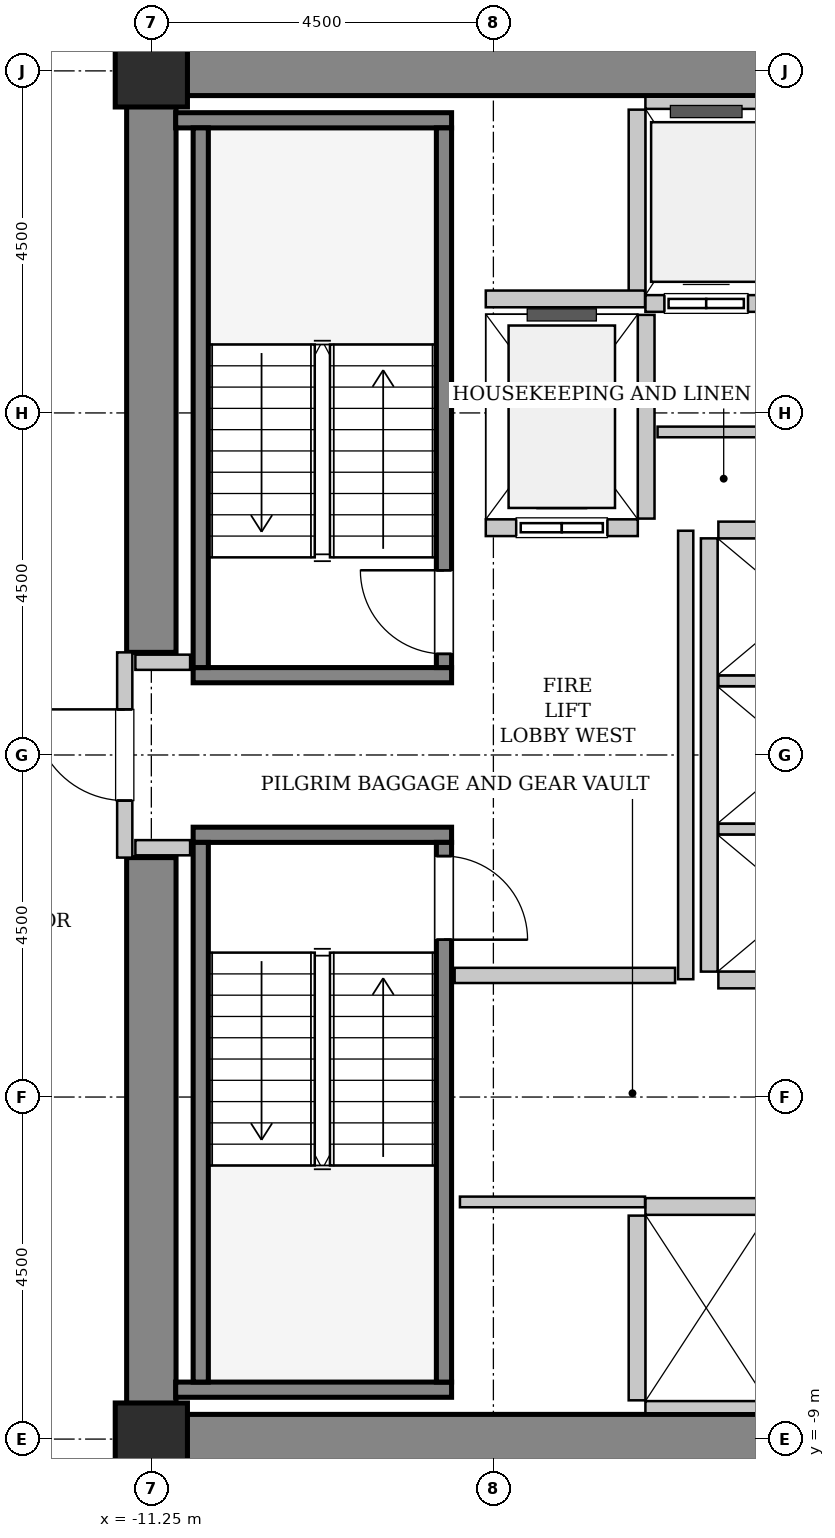
"""IFC4 building model, lengths in metres.
Left out: names, types, materials, properties, quantities, classifications, styles, units other than length and angle.
Written with IfcOpenShell. Run it as: python <this file> out.ifc"""

import sys

from ifc_helpers import new_model, si_unit, direction, frame, frame_2d, origin, origin_2d, place, context, subcontext, project, spatial, rectangle, hollow_rectangle, extrude, source, transform, mapped, element, fill, save


model = new_model("IFC4")
c1 = context("Model", 3, precision=1e-05, world=origin(), true_north=direction((0.0, 1.0)))
c2 = subcontext(c1, "Body", "Model", "MODEL_VIEW")
j1 = project(units=[si_unit("LENGTHUNIT", "METRE"), si_unit("PLANEANGLEUNIT", "RADIAN")], contexts=[c1])
p1 = place(None, origin())
s1 = spatial("IfcSite", under=j1, at=p1, CompositionType="ELEMENT")
p2 = place(p1, origin())
s2 = spatial("IfcBuilding", under=s1, at=p2, CompositionType="ELEMENT")
p3 = place(p2, frame((0.0, 0.0, 48.2)))
s3 = spatial("IfcBuildingStorey", under=s2, at=p3, CompositionType="ELEMENT", Elevation=48.2)
m1 = source(origin(), c2, "Body", "SweptSolid", [
    extrude(rectangle(XDim=10.025, YDim=0.65, at=frame_2d((5.012, 0.0))), origin(), (0.0, 0.0, 1.0), 3.8),
])
for number, where, z_axis, x_axis in (
    (1, (-11.575, 9.0, 0.0), (0.0, 0.0, 1.0), (1.0, 0.0, 0.0)),
    (2, (-11.575, -9.0, 0.0), (0.0, 0.0, 1.0), (1.0, 0.0, 0.0)),
):
    element("IfcWall", number, at=place(p3, frame(where, z_axis=z_axis, x_axis=x_axis)), inside=s3, PredefinedType="SHEAR", context=c2, shape_type="MappedRepresentation", body=[
        mapped(m1, transform((0.0, 0.0, 0.0), x_axis=(1.0, 0.0, 0.0), y_axis=(0.0, 1.0, 0.0), z_axis=(0.0, 0.0, 1.0), scale=1.0)),
    ])
m2 = source(origin(), c2, "Body", "SweptSolid", [
    extrude(rectangle(XDim=7.325, YDim=0.65, at=frame_2d((3.663, 0.0))), origin(), (0.0, 0.0, 1.0), 3.8),
])
for number, where, z_axis, x_axis in (
    (3, (-11.25, -8.675, 0.0), (0.0, 0.0, 1.0), (0.0, 1.0, 0.0)),
    (4, (-11.25, 1.35, 0.0), (0.0, 0.0, 1.0), (0.0, 1.0, 0.0)),
):
    element("IfcWall", number, at=place(p3, frame(where, z_axis=z_axis, x_axis=x_axis)), inside=s3, PredefinedType="SHEAR", context=c2, shape_type="MappedRepresentation", body=[
        mapped(m2, transform((0.0, 0.0, 0.0), x_axis=(1.0, 0.0, 0.0), y_axis=(0.0, 1.0, 0.0), z_axis=(0.0, 0.0, 1.0), scale=1.0)),
    ])
m3 = source(origin(), c2, "Body", "SweptSolid", [
    extrude(hollow_rectangle(XDim=0.95, YDim=0.95, WallThickness=0.045, InnerFilletRadius=0.045, OuterFilletRadius=0.09, at=origin_2d()), origin(), (0.0, 0.0, 1.0), 3.8),
])
for number, where, z_axis, x_axis in (
    (5, (-11.25, -9.0, 0.0), (0.0, 0.0, 1.0), (1.0, 0.0, 0.0)),
    (6, (-11.25, 9.0, 0.0), (0.0, 0.0, 1.0), (1.0, 0.0, 0.0)),
):
    element("IfcColumn", number, at=place(p3, frame(where, z_axis=z_axis, x_axis=x_axis)), inside=s3, PredefinedType="COLUMN", context=c2, shape_type="MappedRepresentation", body=[
        mapped(m3, transform((0.0, 0.0, 0.0), x_axis=(1.0, 0.0, 0.0), y_axis=(0.0, 1.0, 0.0), z_axis=(0.0, 0.0, 1.0), scale=1.0)),
    ])
m4 = source(origin(), c2, "Body", "SweptSolid", [
    extrude(rectangle(XDim=3.4, YDim=0.2, at=frame_2d((1.7, 0.0))), origin(), (0.0, 0.0, 1.0), 3.8),
])
p4 = place(p3, frame((-7.3, 1.05, 0.0), z_axis=(0.0, 0.0, 1.0), x_axis=(-1.0, 0.0, 0.0)))
e7 = element("IfcWall", 7, at=p4, inside=s3, PredefinedType="SOLIDWALL", context=c2, shape_type="MappedRepresentation", body=[
    mapped(m4, transform((0.0, 0.0, 0.0), x_axis=(1.0, 0.0, 0.0), y_axis=(0.0, 1.0, 0.0), z_axis=(0.0, 0.0, 1.0), scale=1.0)),
])
m5 = source(origin(), c2, "Body", "SweptSolid", [
    extrude(rectangle(XDim=3.63, YDim=0.2, at=frame_2d((1.815, 0.0))), origin(), (0.0, 0.0, 1.0), 3.8),
])
p5 = place(p3, frame((-7.3, 8.35, 0.0), z_axis=(0.0, 0.0, 1.0), x_axis=(-1.0, 0.0, 0.0)))
e8 = element("IfcWall", 8, at=p5, inside=s3, PredefinedType="SOLIDWALL", context=c2, shape_type="MappedRepresentation", body=[
    mapped(m5, transform((0.0, 0.0, 0.0), x_axis=(1.0, 0.0, 0.0), y_axis=(0.0, 1.0, 0.0), z_axis=(0.0, 0.0, 1.0), scale=1.0)),
])
m6 = source(origin(), c2, "Body", "SweptSolid", [
    extrude(rectangle(XDim=7.1, YDim=0.2, at=frame_2d((3.55, 0.0))), origin(), (0.0, 0.0, 1.0), 3.8),
])
p6 = place(p3, frame((-7.4, 1.15, 0.0), z_axis=(0.0, 0.0, 1.0), x_axis=(0.0, 1.0, 0.0)))
e9 = element("IfcWall", 9, at=p6, inside=s3, PredefinedType="SOLIDWALL", context=c2, shape_type="MappedRepresentation", body=[
    mapped(m6, transform((0.0, 0.0, 0.0), x_axis=(1.0, 0.0, 0.0), y_axis=(0.0, 1.0, 0.0), z_axis=(0.0, 0.0, 1.0), scale=1.0)),
])
p7 = place(p6, frame((0.18, 0.0, 0.0)))
e10 = element("IfcOpeningElement", 10, at=p7, cuts=e9, PredefinedType="OPENING", context=c2, shape_type="SweptSolid", body=[
    extrude(rectangle(XDim=1.1, YDim=2.15, at=frame_2d((0.55, 1.075))), frame((0.0, 0.11, 0.0), z_axis=(0.0, -1.0, 0.0), x_axis=(1.0, 0.0, 0.0)), (0.0, 0.0, 1.0), 0.22),
])
p8 = place(p3, frame((-10.6, 1.15, 0.0), z_axis=(0.0, 0.0, 1.0), x_axis=(0.0, 1.0, 0.0)))
e11 = element("IfcWall", 11, at=p8, inside=s3, PredefinedType="SOLIDWALL", context=c2, shape_type="MappedRepresentation", body=[
    mapped(m6, transform((0.0, 0.0, 0.0), x_axis=(1.0, 0.0, 0.0), y_axis=(0.0, 1.0, 0.0), z_axis=(0.0, 0.0, 1.0), scale=1.0)),
])
p9 = place(p3, frame((-10.7, -1.05, 0.0), z_axis=(0.0, 0.0, 1.0), x_axis=(1.0, 0.0, 0.0)))
e12 = element("IfcWall", 12, at=p9, inside=s3, PredefinedType="SOLIDWALL", context=c2, shape_type="MappedRepresentation", body=[
    mapped(m4, transform((0.0, 0.0, 0.0), x_axis=(1.0, 0.0, 0.0), y_axis=(0.0, 1.0, 0.0), z_axis=(0.0, 0.0, 1.0), scale=1.0)),
])
p10 = place(p3, frame((-10.93, -8.35, 0.0), z_axis=(0.0, 0.0, 1.0), x_axis=(1.0, 0.0, 0.0)))
e13 = element("IfcWall", 13, at=p10, inside=s3, PredefinedType="SOLIDWALL", context=c2, shape_type="MappedRepresentation", body=[
    mapped(m5, transform((0.0, 0.0, 0.0), x_axis=(1.0, 0.0, 0.0), y_axis=(0.0, 1.0, 0.0), z_axis=(0.0, 0.0, 1.0), scale=1.0)),
])
p11 = place(p3, frame((-10.6, -1.15, 0.0), z_axis=(0.0, 0.0, 1.0), x_axis=(0.0, -1.0, 0.0)))
e14 = element("IfcWall", 14, at=p11, inside=s3, PredefinedType="SOLIDWALL", context=c2, shape_type="MappedRepresentation", body=[
    mapped(m6, transform((0.0, 0.0, 0.0), x_axis=(1.0, 0.0, 0.0), y_axis=(0.0, 1.0, 0.0), z_axis=(0.0, 0.0, 1.0), scale=1.0)),
])
p12 = place(p3, frame((-7.4, -1.15, 0.0), z_axis=(0.0, 0.0, 1.0), x_axis=(0.0, -1.0, 0.0)))
e15 = element("IfcWall", 15, at=p12, inside=s3, PredefinedType="SOLIDWALL", context=c2, shape_type="MappedRepresentation", body=[
    mapped(m6, transform((0.0, 0.0, 0.0), x_axis=(1.0, 0.0, 0.0), y_axis=(0.0, 1.0, 0.0), z_axis=(0.0, 0.0, 1.0), scale=1.0)),
])
p13 = place(p12, frame((0.18, 0.0, 0.0)))
e16 = element("IfcOpeningElement", 16, at=p13, cuts=e15, PredefinedType="OPENING", context=c2, shape_type="SweptSolid", body=[
    extrude(rectangle(XDim=1.1, YDim=2.15, at=frame_2d((0.55, 1.075))), frame((0.0, 0.11, 0.0), z_axis=(0.0, -1.0, 0.0), x_axis=(1.0, 0.0, 0.0)), (0.0, 0.0, 1.0), 0.22),
])
m7 = source(origin(), c2, "Body", "SweptSolid", [
    extrude(rectangle(XDim=2.0, YDim=0.22, at=frame_2d((1.0, 0.0))), origin(), (0.0, 0.0, 1.0), 3.535),
])
p14 = place(p3, frame((-6.85, 2.99, 0.0), z_axis=(0.0, 0.0, 1.0), x_axis=(1.0, 0.0, 0.0)))
e17 = element("IfcWall", 17, at=p14, inside=s3, PredefinedType="SOLIDWALL", context=c2, shape_type="MappedRepresentation", body=[
    mapped(m7, transform((0.0, 0.0, 0.0), x_axis=(1.0, 0.0, 0.0), y_axis=(0.0, 1.0, 0.0), z_axis=(0.0, 0.0, 1.0), scale=1.0)),
])
p15 = place(p14, frame((0.4, 0.0, 0.0)))
e18 = element("IfcOpeningElement", 18, at=p15, cuts=e17, PredefinedType="OPENING", context=c2, shape_type="SweptSolid", body=[
    extrude(rectangle(XDim=1.2, YDim=2.2, at=frame_2d((0.6, 1.1))), frame((0.0, 0.12, 0.0), z_axis=(0.0, -1.0, 0.0), x_axis=(1.0, 0.0, 0.0)), (0.0, 0.0, 1.0), 0.24),
])
m8 = source(origin(), c2, "Body", "SweptSolid", [
    extrude(rectangle(XDim=2.68, YDim=0.22, at=frame_2d((1.34, 0.0))), origin(), (0.0, 0.0, 1.0), 3.535),
])
p16 = place(p3, frame((-4.74, 3.11, 0.0), z_axis=(0.0, 0.0, 1.0), x_axis=(0.0, 1.0, 0.0)))
e19 = element("IfcWall", 19, at=p16, inside=s3, PredefinedType="SOLIDWALL", context=c2, shape_type="MappedRepresentation", body=[
    mapped(m8, transform((0.0, 0.0, 0.0), x_axis=(1.0, 0.0, 0.0), y_axis=(0.0, 1.0, 0.0), z_axis=(0.0, 0.0, 1.0), scale=1.0)),
])
m9 = source(origin(), c2, "Body", "SweptSolid", [
    extrude(rectangle(XDim=3.2, YDim=0.22, at=frame_2d((1.6, 0.0))), origin(), (0.0, 0.0, 1.0), 3.535),
])
p17 = place(p3, frame((-4.75, 5.94, 0.0), z_axis=(0.0, 0.0, 1.0), x_axis=(1.0, 0.0, 0.0)))
e20 = element("IfcWall", 20, at=p17, inside=s3, PredefinedType="SOLIDWALL", context=c2, shape_type="MappedRepresentation", body=[
    mapped(m9, transform((0.0, 0.0, 0.0), x_axis=(1.0, 0.0, 0.0), y_axis=(0.0, 1.0, 0.0), z_axis=(0.0, 0.0, 1.0), scale=1.0)),
])
p18 = place(p17, frame((0.25, 0.0, 0.0)))
e21 = element("IfcOpeningElement", 21, at=p18, cuts=e20, PredefinedType="OPENING", context=c2, shape_type="SweptSolid", body=[
    extrude(rectangle(XDim=1.1, YDim=2.2, at=frame_2d((0.55, 1.1))), frame((0.0, 0.12, 0.0), z_axis=(0.0, -1.0, 0.0), x_axis=(1.0, 0.0, 0.0)), (0.0, 0.0, 1.0), 0.24),
])
p19 = place(p17, frame((1.875, 0.0, 0.0)))
e22 = element("IfcOpeningElement", 22, at=p19, cuts=e20, PredefinedType="OPENING", context=c2, shape_type="SweptSolid", body=[
    extrude(rectangle(XDim=1.1, YDim=2.2, at=frame_2d((0.55, 1.1))), frame((0.0, 0.12, 0.0), z_axis=(0.0, -1.0, 0.0), x_axis=(1.0, 0.0, 0.0)), (0.0, 0.0, 1.0), 0.24),
])
m10 = source(origin(), c2, "Body", "SweptSolid", [
    extrude(rectangle(XDim=3.2, YDim=0.16, at=frame_2d((1.6, 0.0))), origin(), (0.0, 0.0, 1.0), 2.425),
])
p20 = place(p3, frame((-1.55, 8.58, 0.0), z_axis=(0.0, 0.0, 1.0), x_axis=(-1.0, 0.0, 0.0)))
e23 = element("IfcWall", 23, at=p20, inside=s3, PredefinedType="PARTITIONING", context=c2, shape_type="MappedRepresentation", body=[
    mapped(m10, transform((0.0, 0.0, 0.0), x_axis=(1.0, 0.0, 0.0), y_axis=(0.0, 1.0, 0.0), z_axis=(0.0, 0.0, 1.0), scale=1.0)),
])
m11 = source(origin(), c2, "Body", "SweptSolid", [
    extrude(rectangle(XDim=2.43, YDim=0.22, at=frame_2d((1.215, 0.0))), origin(), (0.0, 0.0, 1.0), 3.535),
])
p21 = place(p3, frame((-4.86, 8.49, 0.0), z_axis=(0.0, 0.0, 1.0), x_axis=(0.0, -1.0, 0.0)))
e24 = element("IfcWall", 24, at=p21, inside=s3, PredefinedType="SOLIDWALL", context=c2, shape_type="MappedRepresentation", body=[
    mapped(m11, transform((0.0, 0.0, 0.0), x_axis=(1.0, 0.0, 0.0), y_axis=(0.0, 1.0, 0.0), z_axis=(0.0, 0.0, 1.0), scale=1.0)),
])
p22 = place(p3, frame((-1.55, -5.94, 0.0), z_axis=(0.0, 0.0, 1.0), x_axis=(-1.0, 0.0, 0.0)))
e25 = element("IfcWall", 25, at=p22, inside=s3, PredefinedType="SOLIDWALL", context=c2, shape_type="MappedRepresentation", body=[
    mapped(m9, transform((0.0, 0.0, 0.0), x_axis=(1.0, 0.0, 0.0), y_axis=(0.0, 1.0, 0.0), z_axis=(0.0, 0.0, 1.0), scale=1.0)),
])
p23 = place(p3, frame((-4.75, -8.58, 0.0), z_axis=(0.0, 0.0, 1.0), x_axis=(1.0, 0.0, 0.0)))
e26 = element("IfcWall", 26, at=p23, inside=s3, PredefinedType="PARTITIONING", context=c2, shape_type="MappedRepresentation", body=[
    mapped(m10, transform((0.0, 0.0, 0.0), x_axis=(1.0, 0.0, 0.0), y_axis=(0.0, 1.0, 0.0), z_axis=(0.0, 0.0, 1.0), scale=1.0)),
])
p24 = place(p3, frame((-4.86, -6.06, 0.0), z_axis=(0.0, 0.0, 1.0), x_axis=(0.0, -1.0, 0.0)))
e27 = element("IfcWall", 27, at=p24, inside=s3, PredefinedType="SOLIDWALL", context=c2, shape_type="MappedRepresentation", body=[
    mapped(m11, transform((0.0, 0.0, 0.0), x_axis=(1.0, 0.0, 0.0), y_axis=(0.0, 1.0, 0.0), z_axis=(0.0, 0.0, 1.0), scale=1.0)),
])
m12 = source(origin(), c2, "Body", "SweptSolid", [
    extrude(rectangle(XDim=5.7, YDim=0.22, at=frame_2d((2.85, 0.0))), origin(), (0.0, 0.0, 1.0), 3.535),
])
p25 = place(p3, frame((-3.91, 2.85, 0.0), z_axis=(0.0, 0.0, 1.0), x_axis=(0.0, -1.0, 0.0)))
e28 = element("IfcWall", 28, at=p25, inside=s3, PredefinedType="SOLIDWALL", context=c2, shape_type="MappedRepresentation", body=[
    mapped(m12, transform((0.0, 0.0, 0.0), x_axis=(1.0, 0.0, 0.0), y_axis=(0.0, 1.0, 0.0), z_axis=(0.0, 0.0, 1.0), scale=1.0)),
])
m13 = source(origin(), c2, "Body", "SweptSolid", [
    extrude(rectangle(XDim=2.13, YDim=0.22, at=frame_2d((1.065, 0.0))), origin(), (0.0, 0.0, 1.0), 3.535),
])
p26 = place(p3, frame((-3.79, -2.96, 0.0), z_axis=(0.0, 0.0, 1.0), x_axis=(1.0, 0.0, 0.0)))
e29 = element("IfcWall", 29, at=p26, inside=s3, PredefinedType="SOLIDWALL", context=c2, shape_type="MappedRepresentation", body=[
    mapped(m13, transform((0.0, 0.0, 0.0), x_axis=(1.0, 0.0, 0.0), y_axis=(0.0, 1.0, 0.0), z_axis=(0.0, 0.0, 1.0), scale=1.0)),
])
m14 = source(origin(), c2, "Body", "SweptSolid", [
    extrude(rectangle(XDim=2.13, YDim=0.14, at=frame_2d((1.065, 0.0))), origin(), (0.0, 0.0, 1.0), 3.535),
])
for number, where, z_axis, x_axis in (
    (30, (-3.79, -0.975, 0.0), (0.0, 0.0, 1.0), (1.0, 0.0, 0.0)),
    (31, (-3.79, 0.975, 0.0), (0.0, 0.0, 1.0), (1.0, 0.0, 0.0)),
):
    element("IfcWall", number, at=place(p3, frame(where, z_axis=z_axis, x_axis=x_axis)), inside=s3, PredefinedType="PARTITIONING", context=c2, shape_type="MappedRepresentation", body=[
        mapped(m14, transform((0.0, 0.0, 0.0), x_axis=(1.0, 0.0, 0.0), y_axis=(0.0, 1.0, 0.0), z_axis=(0.0, 0.0, 1.0), scale=1.0)),
    ])
p27 = place(p3, frame((-1.66, 2.96, 0.0), z_axis=(0.0, 0.0, 1.0), x_axis=(-1.0, 0.0, 0.0)))
e32 = element("IfcWall", 32, at=p27, inside=s3, PredefinedType="SOLIDWALL", context=c2, shape_type="MappedRepresentation", body=[
    mapped(m13, transform((0.0, 0.0, 0.0), x_axis=(1.0, 0.0, 0.0), y_axis=(0.0, 1.0, 0.0), z_axis=(0.0, 0.0, 1.0), scale=1.0)),
])
m15 = source(origin(), c2, "Body", "SweptSolid", [
    extrude(rectangle(XDim=2.095, YDim=0.22, at=frame_2d((1.048, 0.0))), origin(), (0.0, 0.0, 1.0), 3.535),
])
p28 = place(p3, frame((-6.85, 6.0, 0.0), z_axis=(0.0, 0.0, 1.0), x_axis=(1.0, 0.0, 0.0)))
e33 = element("IfcWall", 33, at=p28, inside=s3, PredefinedType="SOLIDWALL", context=c2, shape_type="MappedRepresentation", body=[
    mapped(m15, transform((0.0, 0.0, 0.0), x_axis=(1.0, 0.0, 0.0), y_axis=(0.0, 1.0, 0.0), z_axis=(0.0, 0.0, 1.0), scale=1.0)),
])
m16 = source(origin(), c2, "Body", "SweptSolid", [
    extrude(rectangle(XDim=2.7, YDim=0.2, at=frame_2d((1.35, 0.0))), origin(), (0.0, 0.0, 1.0), 2.425),
])
p29 = place(p3, frame((-11.6, -1.35, 0.0), z_axis=(0.0, 0.0, 1.0), x_axis=(0.0, 1.0, 0.0)))
e34 = element("IfcWall", 34, at=p29, inside=s3, PredefinedType="PARTITIONING", context=c2, shape_type="MappedRepresentation", body=[
    mapped(m16, transform((0.0, 0.0, 0.0), x_axis=(1.0, 0.0, 0.0), y_axis=(0.0, 1.0, 0.0), z_axis=(0.0, 0.0, 1.0), scale=1.0)),
])
p30 = place(p29, frame((0.75, 0.0, 0.0)))
e35 = element("IfcOpeningElement", 35, at=p30, cuts=e34, PredefinedType="OPENING", context=c2, shape_type="SweptSolid", body=[
    extrude(rectangle(XDim=1.2, YDim=2.15, at=frame_2d((0.6, 1.075))), frame((0.0, 0.11, 0.0), z_axis=(0.0, -1.0, 0.0), x_axis=(1.0, 0.0, 0.0)), (0.0, 0.0, 1.0), 0.22),
])
m17 = source(origin(), c2, "Body", "SweptSolid", [
    extrude(rectangle(XDim=5.9, YDim=0.2, at=frame_2d((2.95, 0.0))), origin(), (0.0, 0.0, 1.0), 3.535),
])
p31 = place(p3, frame((-4.22, -2.95, 0.0), z_axis=(0.0, 0.0, 1.0), x_axis=(0.0, 1.0, 0.0)))
e36 = element("IfcWall", 36, at=p31, inside=s3, PredefinedType="PARTITIONING", context=c2, shape_type="MappedRepresentation", body=[
    mapped(m17, transform((0.0, 0.0, 0.0), x_axis=(1.0, 0.0, 0.0), y_axis=(0.0, 1.0, 0.0), z_axis=(0.0, 0.0, 1.0), scale=1.0)),
])
m18 = source(origin(), c2, "Body", "SweptSolid", [
    extrude(rectangle(XDim=2.9, YDim=0.2, at=frame_2d((1.45, 0.0))), origin(), (0.0, 0.0, 1.0), 3.535),
])
p32 = place(p3, frame((-7.26, -2.9, 0.0), z_axis=(0.0, 0.0, 1.0), x_axis=(1.0, 0.0, 0.0)))
e37 = element("IfcWall", 37, at=p32, inside=s3, PredefinedType="PARTITIONING", context=c2, shape_type="MappedRepresentation", body=[
    mapped(m18, transform((0.0, 0.0, 0.0), x_axis=(1.0, 0.0, 0.0), y_axis=(0.0, 1.0, 0.0), z_axis=(0.0, 0.0, 1.0), scale=1.0)),
])
m19 = source(origin(), c2, "Body", "SweptSolid", [
    extrude(rectangle(XDim=0.72, YDim=0.2, at=frame_2d((0.36, 0.0))), origin(), (0.0, 0.0, 1.0), 3.535),
])
for number, where, z_axis, x_axis in (
    (38, (-11.46, 1.22, 0.0), (0.0, 0.0, 1.0), (1.0, 0.0, 0.0)),
    (39, (-11.46, -1.22, 0.0), (0.0, 0.0, 1.0), (1.0, 0.0, 0.0)),
):
    element("IfcWall", number, at=place(p3, frame(where, z_axis=z_axis, x_axis=x_axis)), inside=s3, PredefinedType="PARTITIONING", context=c2, shape_type="MappedRepresentation", body=[
        mapped(m19, transform((0.0, 0.0, 0.0), x_axis=(1.0, 0.0, 0.0), y_axis=(0.0, 1.0, 0.0), z_axis=(0.0, 0.0, 1.0), scale=1.0)),
    ])
m20 = source(origin(), c2, "Body", "SweptSolid", [
    extrude(rectangle(XDim=2.95, YDim=0.14, at=frame_2d((1.475, 0.0))), origin(), (0.0, 0.0, 1.0), 3.535),
])
p33 = place(p3, frame((-4.59, 4.25, 0.0), z_axis=(0.0, 0.0, 1.0), x_axis=(1.0, 0.0, 0.0)))
e40 = element("IfcWall", 40, at=p33, inside=s3, PredefinedType="PARTITIONING", context=c2, shape_type="MappedRepresentation", body=[
    mapped(m20, transform((0.0, 0.0, 0.0), x_axis=(1.0, 0.0, 0.0), y_axis=(0.0, 1.0, 0.0), z_axis=(0.0, 0.0, 1.0), scale=1.0)),
])
m21 = source(origin(), c2, "Body", "SweptSolid", [
    extrude(rectangle(XDim=2.435, YDim=0.14, at=frame_2d((1.218, 0.0))), origin(), (0.0, 0.0, 1.0), 3.535),
])
p34 = place(p3, frame((-7.19, -5.88, 0.0), z_axis=(0.0, 0.0, 1.0), x_axis=(1.0, 0.0, 0.0)))
e41 = element("IfcWall", 41, at=p34, inside=s3, PredefinedType="PARTITIONING", context=c2, shape_type="MappedRepresentation", body=[
    mapped(m21, transform((0.0, 0.0, 0.0), x_axis=(1.0, 0.0, 0.0), y_axis=(0.0, 1.0, 0.0), z_axis=(0.0, 0.0, 1.0), scale=1.0)),
])
m22 = source(origin(), c2, "Body", "SweptSolid", [
    extrude(rectangle(XDim=1.1, YDim=2.15, at=frame_2d((0.55, 1.075))), frame((0.0, 0.025, 0.0), z_axis=(0.0, -1.0, 0.0), x_axis=(1.0, 0.0, 0.0)), (0.0, 0.0, 1.0), 0.05),
])
p35 = place(p7, origin())
e42 = element("IfcDoor", 42, at=p35, inside=s3, OperationType="SINGLE_SWING_RIGHT", PredefinedType="DOOR", context=c2, shape_type="MappedRepresentation", body=[
    mapped(m22, transform((0.0, 0.0, 0.0), x_axis=(1.0, 0.0, 0.0), y_axis=(0.0, 1.0, 0.0), z_axis=(0.0, 0.0, 1.0), scale=1.0)),
])
fill(e10, e42)
p36 = place(p13, origin())
e43 = element("IfcDoor", 43, at=p36, inside=s3, OperationType="SINGLE_SWING_RIGHT", PredefinedType="DOOR", context=c2, shape_type="MappedRepresentation", body=[
    mapped(m22, transform((0.0, 0.0, 0.0), x_axis=(1.0, 0.0, 0.0), y_axis=(0.0, 1.0, 0.0), z_axis=(0.0, 0.0, 1.0), scale=1.0)),
])
fill(e16, e43)
m23 = source(origin(), c2, "Body", "SweptSolid", [
    extrude(rectangle(XDim=1.2, YDim=2.2, at=frame_2d((0.6, 1.1))), frame((0.0, 0.025, 0.0), z_axis=(0.0, -1.0, 0.0), x_axis=(1.0, 0.0, 0.0)), (0.0, 0.0, 1.0), 0.05),
])
p37 = place(p15, origin())
e44 = element("IfcDoor", 44, at=p37, inside=s3, OperationType="SLIDING_TO_LEFT", PredefinedType="DOOR", context=c2, shape_type="MappedRepresentation", body=[
    mapped(m23, transform((0.0, 0.0, 0.0), x_axis=(1.0, 0.0, 0.0), y_axis=(0.0, 1.0, 0.0), z_axis=(0.0, 0.0, 1.0), scale=1.0)),
])
fill(e18, e44)
m24 = source(origin(), c2, "Body", "SweptSolid", [
    extrude(rectangle(XDim=1.1, YDim=2.2, at=frame_2d((0.55, 1.1))), frame((0.0, 0.025, 0.0), z_axis=(0.0, -1.0, 0.0), x_axis=(1.0, 0.0, 0.0)), (0.0, 0.0, 1.0), 0.05),
])
p38 = place(p18, origin())
e45 = element("IfcDoor", 45, at=p38, inside=s3, OperationType="DOUBLE_DOOR_SLIDING", PredefinedType="DOOR", context=c2, shape_type="MappedRepresentation", body=[
    mapped(m24, transform((0.0, 0.0, 0.0), x_axis=(1.0, 0.0, 0.0), y_axis=(0.0, 1.0, 0.0), z_axis=(0.0, 0.0, 1.0), scale=1.0)),
])
fill(e21, e45)
m25 = source(origin(), c2, "Body", "SweptSolid", [
    extrude(rectangle(XDim=1.2, YDim=2.15, at=frame_2d((0.6, 1.075))), frame((0.0, 0.025, 0.0), z_axis=(0.0, -1.0, 0.0), x_axis=(1.0, 0.0, 0.0)), (0.0, 0.0, 1.0), 0.05),
])
p39 = place(p30, origin())
e46 = element("IfcDoor", 46, at=p39, inside=s3, OperationType="SINGLE_SWING_RIGHT", PredefinedType="DOOR", context=c2, shape_type="MappedRepresentation", body=[
    mapped(m25, transform((0.0, 0.0, 0.0), x_axis=(1.0, 0.0, 0.0), y_axis=(0.0, 1.0, 0.0), z_axis=(0.0, 0.0, 1.0), scale=1.0)),
])
fill(e35, e46)
save(model, sys.argv[1])
